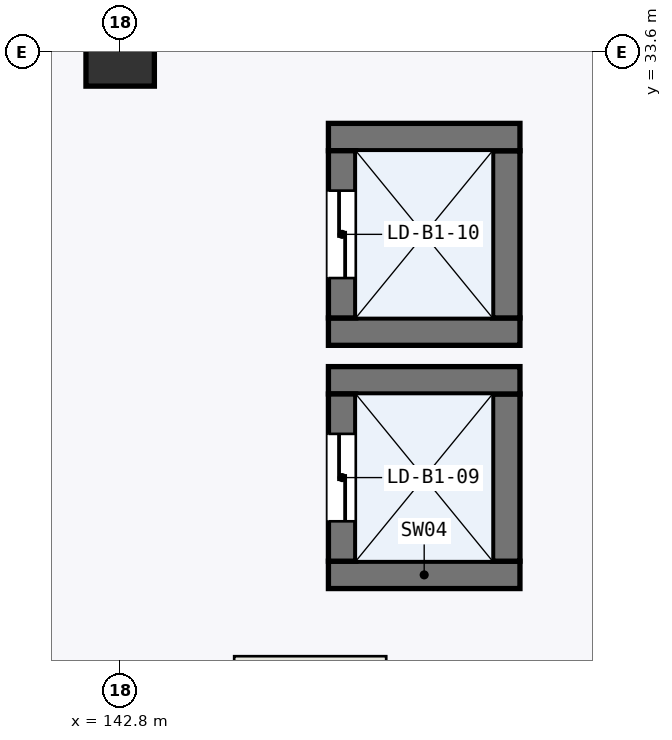
"""IFC4 building model, lengths in metres.
Left out: names, types, materials, properties, quantities, classifications, styles, units other than length and angle.
Written with IfcOpenShell. Run it as: python <this file> out.ifc"""

import sys

from ifc_helpers import new_model, si_unit, direction, frame, frame_2d, origin, origin_2d, place, context, subcontext, project, spatial, rectangle, extrude, element, fill, save


model = new_model("IFC4")
c1 = context("Model", 3, precision=1e-05, world=origin(), true_north=direction((0.0, 1.0)))
c2 = subcontext(c1, "Body", "Model", "MODEL_VIEW")
j1 = project(units=[si_unit("LENGTHUNIT", "METRE"), si_unit("PLANEANGLEUNIT", "RADIAN")], contexts=[c1])
p1 = place(None, origin())
s1 = spatial("IfcSite", under=j1, at=p1, CompositionType="ELEMENT")
p2 = place(p1, origin())
s2 = spatial("IfcBuilding", under=s1, at=p2, CompositionType="ELEMENT")
p3 = place(p2, frame((0.0, 0.0, -5.4)))
s3 = spatial("IfcBuildingStorey", under=s2, at=p3, CompositionType="ELEMENT", Elevation=-5.4)
p4 = place(p3, frame((142.8, 33.6, 0.0), z_axis=(0.0, 0.0, 1.0), x_axis=(1.0, 0.0, 0.0)))
e1 = element("IfcColumn", 1, at=p4, inside=s3, PredefinedType="COLUMN", context=c2, shape_type="SweptSolid", body=[
    extrude(rectangle(XDim=0.9, YDim=0.9, at=origin_2d()), origin(), (0.0, 0.0, 1.0), 5.4),
])
p5 = place(p3, frame((145.54, 26.72, 0.0), z_axis=(0.0, 0.0, 1.0), x_axis=(1.0, 0.0, 0.0)))
e2 = element("IfcWall", 2, at=p5, inside=s3, PredefinedType="SHEAR", context=c2, shape_type="SweptSolid", body=[
    extrude(rectangle(XDim=2.52, YDim=0.36, at=frame_2d((1.26, 0.0))), origin(), (0.0, 0.0, 1.0), 5.145),
])
p6 = place(p3, frame((147.88, 26.9, 0.0), z_axis=(0.0, 0.0, 1.0), x_axis=(0.0, 1.0, 0.0)))
e3 = element("IfcWall", 3, at=p6, inside=s3, PredefinedType="SHEAR", context=c2, shape_type="SweptSolid", body=[
    extrude(rectangle(XDim=2.2, YDim=0.36, at=frame_2d((1.1, 0.0))), origin(), (0.0, 0.0, 1.0), 5.145),
])
p7 = place(p3, frame((148.06, 29.28, 0.0), z_axis=(0.0, 0.0, 1.0), x_axis=(-1.0, 0.0, 0.0)))
e4 = element("IfcWall", 4, at=p7, inside=s3, PredefinedType="SHEAR", context=c2, shape_type="SweptSolid", body=[
    extrude(rectangle(XDim=2.52, YDim=0.36, at=frame_2d((1.26, 0.0))), origin(), (0.0, 0.0, 1.0), 5.145),
])
p8 = place(p3, frame((145.72, 29.1, 0.0), z_axis=(0.0, 0.0, 1.0), x_axis=(0.0, -1.0, 0.0)))
e5 = element("IfcWall", 5, at=p8, inside=s3, PredefinedType="SHEAR", context=c2, shape_type="SweptSolid", body=[
    extrude(rectangle(XDim=2.2, YDim=0.36, at=frame_2d((1.1, 0.0))), origin(), (0.0, 0.0, 1.0), 5.145),
])
p9 = place(p8, frame((0.525, 0.0, 0.0)))
e6 = element("IfcOpeningElement", 6, at=p9, cuts=e5, PredefinedType="OPENING", context=c2, shape_type="SweptSolid", body=[
    extrude(rectangle(XDim=1.15, YDim=2.2, at=frame_2d((0.575, 1.1))), frame((0.0, 0.19, 0.0), z_axis=(0.0, -1.0, 0.0), x_axis=(1.0, 0.0, 0.0)), (0.0, 0.0, 1.0), 0.38),
])
p10 = place(p3, frame((145.54, 29.92, 0.0), z_axis=(0.0, 0.0, 1.0), x_axis=(1.0, 0.0, 0.0)))
e7 = element("IfcWall", 7, at=p10, inside=s3, PredefinedType="SHEAR", context=c2, shape_type="SweptSolid", body=[
    extrude(rectangle(XDim=2.52, YDim=0.36, at=frame_2d((1.26, 0.0))), origin(), (0.0, 0.0, 1.0), 5.145),
])
p11 = place(p3, frame((147.88, 30.1, 0.0), z_axis=(0.0, 0.0, 1.0), x_axis=(0.0, 1.0, 0.0)))
e8 = element("IfcWall", 8, at=p11, inside=s3, PredefinedType="SHEAR", context=c2, shape_type="SweptSolid", body=[
    extrude(rectangle(XDim=2.2, YDim=0.36, at=frame_2d((1.1, 0.0))), origin(), (0.0, 0.0, 1.0), 5.145),
])
p12 = place(p3, frame((148.06, 32.48, 0.0), z_axis=(0.0, 0.0, 1.0), x_axis=(-1.0, 0.0, 0.0)))
e9 = element("IfcWall", 9, at=p12, inside=s3, PredefinedType="SHEAR", context=c2, shape_type="SweptSolid", body=[
    extrude(rectangle(XDim=2.52, YDim=0.36, at=frame_2d((1.26, 0.0))), origin(), (0.0, 0.0, 1.0), 5.145),
])
p13 = place(p3, frame((145.72, 32.3, 0.0), z_axis=(0.0, 0.0, 1.0), x_axis=(0.0, -1.0, 0.0)))
e10 = element("IfcWall", 10, at=p13, inside=s3, PredefinedType="SHEAR", context=c2, shape_type="SweptSolid", body=[
    extrude(rectangle(XDim=2.2, YDim=0.36, at=frame_2d((1.1, 0.0))), origin(), (0.0, 0.0, 1.0), 5.145),
])
p14 = place(p13, frame((0.525, 0.0, 0.0)))
e11 = element("IfcOpeningElement", 11, at=p14, cuts=e10, PredefinedType="OPENING", context=c2, shape_type="SweptSolid", body=[
    extrude(rectangle(XDim=1.15, YDim=2.2, at=frame_2d((0.575, 1.1))), frame((0.0, 0.19, 0.0), z_axis=(0.0, -1.0, 0.0), x_axis=(1.0, 0.0, 0.0)), (0.0, 0.0, 1.0), 0.38),
])
p15 = place(p9, frame((1.15, 0.0, 0.0), z_axis=(0.0, 0.0, 1.0), x_axis=(-1.0, 0.0, 0.0)))
e12 = element("IfcDoor", 12, at=p15, inside=s3, OperationType="DOUBLE_DOOR_SLIDING", PredefinedType="DOOR", context=c2, shape_type="SweptSolid", body=[
    extrude(rectangle(XDim=1.15, YDim=2.2, at=frame_2d((0.575, 1.1))), frame((0.0, 0.025, 0.0), z_axis=(0.0, -1.0, 0.0), x_axis=(1.0, 0.0, 0.0)), (0.0, 0.0, 1.0), 0.05),
])
fill(e6, e12)
p16 = place(p14, frame((1.15, 0.0, 0.0), z_axis=(0.0, 0.0, 1.0), x_axis=(-1.0, 0.0, 0.0)))
e13 = element("IfcDoor", 13, at=p16, inside=s3, OperationType="DOUBLE_DOOR_SLIDING", PredefinedType="DOOR", context=c2, shape_type="SweptSolid", body=[
    extrude(rectangle(XDim=1.15, YDim=2.2, at=frame_2d((0.575, 1.1))), frame((0.0, 0.025, 0.0), z_axis=(0.0, -1.0, 0.0), x_axis=(1.0, 0.0, 0.0)), (0.0, 0.0, 1.0), 0.05),
])
fill(e11, e13)
save(model, sys.argv[1])
